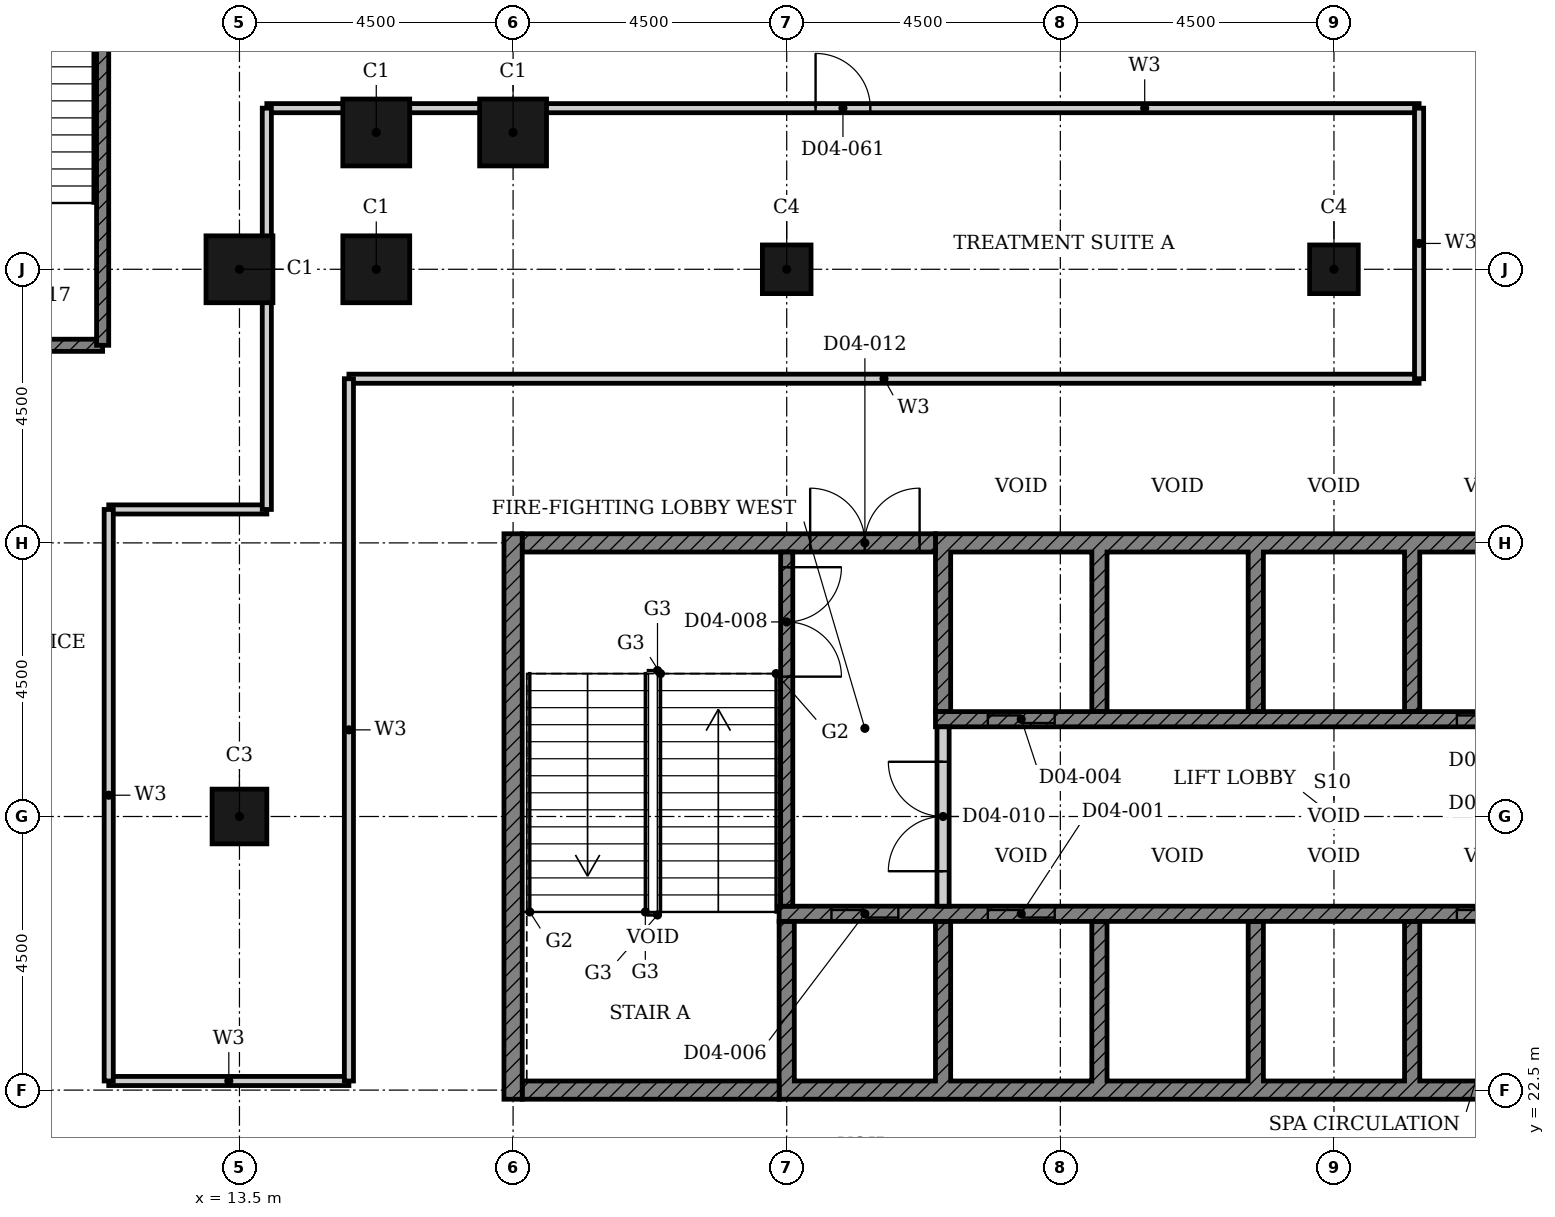
"""IFC4 building model, lengths in metres.
Left out: names, types, materials, properties, quantities, classifications, styles, units other than length and angle.
Written with IfcOpenShell. Run it as: python <this file> out.ifc"""

import sys

from ifc_helpers import new_model, si_unit, direction, frame, frame_2d, origin, origin_2d, place, context, subcontext, project, spatial, polyline, rectangle, hollow_rectangle, outline, extrude, element, fill, save


model = new_model("IFC4")
c1 = context("Model", 3, precision=1e-05, world=origin(), true_north=direction((0.0, 1.0)))
c2 = subcontext(c1, "Body", "Model", "MODEL_VIEW")
j1 = project(units=[si_unit("LENGTHUNIT", "METRE"), si_unit("PLANEANGLEUNIT", "RADIAN")], contexts=[c1])
p1 = place(None, origin())
s1 = spatial("IfcSite", under=j1, at=p1, CompositionType="ELEMENT")
p2 = place(p1, origin())
s2 = spatial("IfcBuilding", under=s1, at=p2, CompositionType="ELEMENT")
p3 = place(p2, frame((0.0, 0.0, 24.0)))
s3 = spatial("IfcBuildingStorey", under=s2, at=p3, CompositionType="ELEMENT", Elevation=24.0)
for number, where, z_axis, x_axis in (
    (1, (18.0, 38.25, 0.0), (0.0, 0.0, 1.0), (1.0, 0.0, 0.0)),
    (2, (15.75, 38.25, 0.0), (0.0, 0.0, 1.0), (1.0, 0.0, 0.0)),
    (3, (15.75, 36.0, 0.0), (0.0, 0.0, 1.0), (1.0, 0.0, 0.0)),
    (4, (13.5, 36.0, 0.0), (0.0, 0.0, 1.0), (1.0, 0.0, 0.0)),
):
    element("IfcColumn", number, at=place(p3, frame(where, z_axis=z_axis, x_axis=x_axis)), inside=s3, PredefinedType="COLUMN", context=c2, shape_type="SweptSolid", body=[
        extrude(hollow_rectangle(XDim=1.1, YDim=1.1, WallThickness=0.036, at=origin_2d()), origin(), (0.0, 0.0, 1.0), 4.8),
    ])
p4 = place(p3, frame((13.5, 27.0, 0.0), z_axis=(0.0, 0.0, 1.0), x_axis=(1.0, 0.0, 0.0)))
e5 = element("IfcColumn", 5, at=p4, inside=s3, PredefinedType="COLUMN", context=c2, shape_type="SweptSolid", body=[
    extrude(hollow_rectangle(XDim=0.9, YDim=0.9, WallThickness=0.028, at=origin_2d()), origin(), (0.0, 0.0, 1.0), 4.8),
])
for number, where, z_axis, x_axis in (
    (6, (22.5, 36.0, 0.0), (0.0, 0.0, 1.0), (1.0, 0.0, 0.0)),
    (7, (31.5, 36.0, 0.0), (0.0, 0.0, 1.0), (1.0, 0.0, 0.0)),
):
    element("IfcColumn", number, at=place(p3, frame(where, z_axis=z_axis, x_axis=x_axis)), inside=s3, PredefinedType="COLUMN", context=c2, shape_type="SweptSolid", body=[
        extrude(hollow_rectangle(XDim=0.8, YDim=0.8, WallThickness=0.025, at=origin_2d()), origin(), (0.0, 0.0, 1.0), 4.8),
    ])
p5 = place(p3, origin())
e8 = element("IfcWall", 8, at=p5, inside=s3, PredefinedType="SHEAR", context=c2, shape_type="SweptSolid", body=[
    extrude(outline(polyline([(22.375, 22.35), (38.053, 22.35), (38.053, 25.275), (37.803, 25.275), (37.803, 22.65), (35.482, 22.65), (35.482, 25.275), (35.232, 25.275), (35.232, 22.65), (32.911, 22.65), (32.911, 25.275), (32.661, 25.275), (32.661, 22.65), (30.339, 22.65), (30.339, 25.275), (30.089, 25.275), (30.089, 22.65), (27.768, 22.65), (27.768, 25.275), (27.518, 25.275), (27.518, 22.65), (25.197, 22.65), (25.197, 25.275), (24.947, 25.275), (24.947, 22.65), (22.625, 22.65), (22.625, 25.275), (22.375, 25.275), (22.375, 22.35)])), origin(), (0.0, 0.0, 1.0), 4.45),
])
p6 = place(p3, origin())
e9 = element("IfcWall", 9, at=p6, inside=s3, PredefinedType="SHEAR", context=c2, shape_type="SweptSolid", body=[
    extrude(outline(polyline([(24.947, 28.725), (25.197, 28.725), (25.197, 31.35), (27.518, 31.35), (27.518, 28.725), (27.768, 28.725), (27.768, 31.35), (30.089, 31.35), (30.089, 28.725), (30.339, 28.725), (30.339, 31.35), (32.661, 31.35), (32.661, 28.725), (32.911, 28.725), (32.911, 31.35), (35.232, 31.35), (35.232, 28.725), (35.482, 28.725), (35.482, 31.35), (37.803, 31.35), (37.803, 28.725), (38.053, 28.725), (38.053, 31.35), (40.375, 31.35), (40.375, 28.725), (40.625, 28.725), (40.625, 31.65), (24.947, 31.65), (24.947, 28.725)])), origin(), (0.0, 0.0, 1.0), 4.45),
])
p7 = place(p3, frame((18.15, 22.5, 0.0), z_axis=(0.0, 0.0, 1.0), x_axis=(1.0, 0.0, 0.0)))
e10 = element("IfcWall", 10, at=p7, inside=s3, PredefinedType="SHEAR", context=c2, shape_type="SweptSolid", body=[
    extrude(rectangle(XDim=4.225, YDim=0.3, at=frame_2d((2.113, 0.0))), origin(), (0.0, 0.0, 1.0), 4.45),
])
p8 = place(p3, frame((18.15, 31.5, 0.0), z_axis=(0.0, 0.0, 1.0), x_axis=(1.0, 0.0, 0.0)))
e11 = element("IfcWall", 11, at=p8, inside=s3, PredefinedType="SHEAR", context=c2, shape_type="SweptSolid", body=[
    extrude(rectangle(XDim=6.797, YDim=0.3, at=frame_2d((3.398, 0.0))), origin(), (0.0, 0.0, 1.0), 4.45),
])
p9 = place(p8, frame((4.736, 0.0, 0.0)))
e12 = element("IfcOpeningElement", 12, at=p9, cuts=e11, PredefinedType="OPENING", context=c2, shape_type="SweptSolid", body=[
    extrude(rectangle(XDim=1.8, YDim=2.1, at=frame_2d((0.9, 1.05))), frame((0.0, 0.16, 0.0), z_axis=(0.0, -1.0, 0.0), x_axis=(1.0, 0.0, 0.0)), (0.0, 0.0, 1.0), 0.32),
])
p10 = place(p3, frame((18.0, 22.35, 0.0), z_axis=(0.0, 0.0, 1.0), x_axis=(0.0, 1.0, 0.0)))
e13 = element("IfcWall", 13, at=p10, inside=s3, PredefinedType="SHEAR", context=c2, shape_type="SweptSolid", body=[
    extrude(rectangle(XDim=9.3, YDim=0.3, at=frame_2d((4.65, 0.0))), origin(), (0.0, 0.0, 1.0), 4.45),
])
p11 = place(p3, frame((22.375, 25.4, 0.0), z_axis=(0.0, 0.0, 1.0), x_axis=(1.0, 0.0, 0.0)))
e14 = element("IfcWall", 14, at=p11, inside=s3, PredefinedType="SHEAR", context=c2, shape_type="SweptSolid", body=[
    extrude(rectangle(XDim=15.678, YDim=0.25, at=frame_2d((7.839, 0.0))), origin(), (0.0, 0.0, 1.0), 4.45),
])
p12 = place(p11, frame((3.432, 0.0, 0.0)))
e15 = element("IfcOpeningElement", 15, at=p12, cuts=e14, PredefinedType="OPENING", context=c2, shape_type="SweptSolid", body=[
    extrude(rectangle(XDim=1.1, YDim=2.1, at=frame_2d((0.55, 1.05))), frame((0.0, 0.135, 0.0), z_axis=(0.0, -1.0, 0.0), x_axis=(1.0, 0.0, 0.0)), (0.0, 0.0, 1.0), 0.27),
])
p13 = place(p11, frame((11.146, 0.0, 0.0)))
e16 = element("IfcOpeningElement", 16, at=p13, cuts=e14, PredefinedType="OPENING", context=c2, shape_type="SweptSolid", body=[
    extrude(rectangle(XDim=1.1, YDim=2.1, at=frame_2d((0.55, 1.05))), frame((0.0, 0.135, 0.0), z_axis=(0.0, -1.0, 0.0), x_axis=(1.0, 0.0, 0.0)), (0.0, 0.0, 1.0), 0.27),
])
p14 = place(p11, frame((13.718, 0.0, 0.0)))
e17 = element("IfcOpeningElement", 17, at=p14, cuts=e14, PredefinedType="OPENING", context=c2, shape_type="SweptSolid", body=[
    extrude(rectangle(XDim=1.1, YDim=2.1, at=frame_2d((0.55, 1.05))), frame((0.0, 0.135, 0.0), z_axis=(0.0, -1.0, 0.0), x_axis=(1.0, 0.0, 0.0)), (0.0, 0.0, 1.0), 0.27),
])
p15 = place(p11, frame((0.861, 0.0, 0.0)))
e18 = element("IfcOpeningElement", 18, at=p15, cuts=e14, PredefinedType="OPENING", context=c2, shape_type="SweptSolid", body=[
    extrude(rectangle(XDim=1.1, YDim=2.1, at=frame_2d((0.55, 1.05))), frame((0.0, 0.135, 0.0), z_axis=(0.0, -1.0, 0.0), x_axis=(1.0, 0.0, 0.0)), (0.0, 0.0, 1.0), 0.27),
])
p16 = place(p3, frame((24.947, 28.6, 0.0), z_axis=(0.0, 0.0, 1.0), x_axis=(1.0, 0.0, 0.0)))
e19 = element("IfcWall", 19, at=p16, inside=s3, PredefinedType="SHEAR", context=c2, shape_type="SweptSolid", body=[
    extrude(rectangle(XDim=15.678, YDim=0.25, at=frame_2d((7.839, 0.0))), origin(), (0.0, 0.0, 1.0), 4.45),
])
p17 = place(p16, frame((0.861, 0.0, 0.0)))
e20 = element("IfcOpeningElement", 20, at=p17, cuts=e19, PredefinedType="OPENING", context=c2, shape_type="SweptSolid", body=[
    extrude(rectangle(XDim=1.1, YDim=2.1, at=frame_2d((0.55, 1.05))), frame((0.0, 0.135, 0.0), z_axis=(0.0, -1.0, 0.0), x_axis=(1.0, 0.0, 0.0)), (0.0, 0.0, 1.0), 0.27),
])
p18 = place(p16, frame((8.575, 0.0, 0.0)))
e21 = element("IfcOpeningElement", 21, at=p18, cuts=e19, PredefinedType="OPENING", context=c2, shape_type="SweptSolid", body=[
    extrude(rectangle(XDim=1.1, YDim=2.1, at=frame_2d((0.55, 1.05))), frame((0.0, 0.135, 0.0), z_axis=(0.0, -1.0, 0.0), x_axis=(1.0, 0.0, 0.0)), (0.0, 0.0, 1.0), 0.27),
])
p19 = place(p16, frame((13.718, 0.0, 0.0)))
e22 = element("IfcOpeningElement", 22, at=p19, cuts=e19, PredefinedType="OPENING", context=c2, shape_type="SweptSolid", body=[
    extrude(rectangle(XDim=1.1, YDim=2.1, at=frame_2d((0.55, 1.05))), frame((0.0, 0.135, 0.0), z_axis=(0.0, -1.0, 0.0), x_axis=(1.0, 0.0, 0.0)), (0.0, 0.0, 1.0), 0.27),
])
p20 = place(p3, frame((22.5, 31.35, 0.0), z_axis=(0.0, 0.0, 1.0), x_axis=(0.0, -1.0, 0.0)))
e23 = element("IfcWall", 23, at=p20, inside=s3, PredefinedType="SHEAR", context=c2, shape_type="SweptSolid", body=[
    extrude(rectangle(XDim=5.825, YDim=0.2, at=frame_2d((2.913, 0.0))), origin(), (0.0, 0.0, 1.0), 4.45),
])
p21 = place(p20, frame((0.25, 0.0, 0.0)))
e24 = element("IfcOpeningElement", 24, at=p21, cuts=e23, PredefinedType="OPENING", context=c2, shape_type="SweptSolid", body=[
    extrude(rectangle(XDim=1.8, YDim=2.1, at=frame_2d((0.9, 1.05))), frame((0.0, 0.11, 0.0), z_axis=(0.0, -1.0, 0.0), x_axis=(1.0, 0.0, 0.0)), (0.0, 0.0, 1.0), 0.22),
])
p22 = place(p3, frame((25.072, 25.525, 0.0), z_axis=(0.0, 0.0, 1.0), x_axis=(0.0, 1.0, 0.0)))
e25 = element("IfcWall", 25, at=p22, inside=s3, PredefinedType="PARTITIONING", context=c2, shape_type="SweptSolid", body=[
    extrude(rectangle(XDim=2.95, YDim=0.2, at=frame_2d((1.475, 0.0))), origin(), (0.0, 0.0, 1.0), 4.45),
])
p23 = place(p22, frame((0.575, 0.0, 0.0)))
e26 = element("IfcOpeningElement", 26, at=p23, cuts=e25, PredefinedType="OPENING", context=c2, shape_type="SweptSolid", body=[
    extrude(rectangle(XDim=1.8, YDim=2.1, at=frame_2d((0.9, 1.05))), frame((0.0, 0.11, 0.0), z_axis=(0.0, -1.0, 0.0), x_axis=(1.0, 0.0, 0.0)), (0.0, 0.0, 1.0), 0.22),
])
p24 = place(p3, frame((11.35, 22.65, 0.0), z_axis=(0.0, 0.0, 1.0), x_axis=(1.0, 0.0, 0.0)))
e27 = element("IfcWall", 27, at=p24, inside=s3, PredefinedType="PARTITIONING", context=c2, shape_type="SweptSolid", body=[
    extrude(rectangle(XDim=3.95, YDim=0.15, at=frame_2d((1.975, 0.0))), origin(), (0.0, 0.0, 1.0), 4.45),
])
p25 = place(p3, frame((11.35, 32.05, 0.0), z_axis=(0.0, 0.0, 1.0), x_axis=(1.0, 0.0, 0.0)))
e28 = element("IfcWall", 28, at=p25, inside=s3, PredefinedType="PARTITIONING", context=c2, shape_type="SweptSolid", body=[
    extrude(rectangle(XDim=2.6, YDim=0.15, at=frame_2d((1.3, 0.0))), origin(), (0.0, 0.0, 1.0), 4.45),
])
p26 = place(p3, frame((15.3, 34.2, 0.0), z_axis=(0.0, 0.0, 1.0), x_axis=(1.0, 0.0, 0.0)))
e29 = element("IfcWall", 29, at=p26, inside=s3, PredefinedType="PARTITIONING", context=c2, shape_type="SweptSolid", body=[
    extrude(rectangle(XDim=17.6, YDim=0.15, at=frame_2d((8.8, 0.0))), origin(), (0.0, 0.0, 1.0), 4.45),
])
p27 = place(p3, frame((13.95, 38.65, 0.0), z_axis=(0.0, 0.0, 1.0), x_axis=(1.0, 0.0, 0.0)))
e30 = element("IfcWall", 30, at=p27, inside=s3, PredefinedType="PARTITIONING", context=c2, shape_type="SweptSolid", body=[
    extrude(rectangle(XDim=18.95, YDim=0.15, at=frame_2d((9.475, 0.0))), origin(), (0.0, 0.0, 1.0), 4.45),
])
p28 = place(p27, frame((9.025, 0.0, 0.0)))
e31 = element("IfcOpeningElement", 31, at=p28, cuts=e30, PredefinedType="OPENING", context=c2, shape_type="SweptSolid", body=[
    extrude(rectangle(XDim=0.9, YDim=2.1, at=frame_2d((0.45, 1.05))), frame((0.0, 0.085, 0.0), z_axis=(0.0, -1.0, 0.0), x_axis=(1.0, 0.0, 0.0)), (0.0, 0.0, 1.0), 0.17),
])
p29 = place(p3, frame((11.35, 22.65, 0.0), z_axis=(0.0, 0.0, 1.0), x_axis=(0.0, 1.0, 0.0)))
e32 = element("IfcWall", 32, at=p29, inside=s3, PredefinedType="PARTITIONING", context=c2, shape_type="SweptSolid", body=[
    extrude(rectangle(XDim=9.4, YDim=0.15, at=frame_2d((4.7, 0.0))), origin(), (0.0, 0.0, 1.0), 4.45),
])
p30 = place(p3, frame((13.95, 32.05, 0.0), z_axis=(0.0, 0.0, 1.0), x_axis=(0.0, 1.0, 0.0)))
e33 = element("IfcWall", 33, at=p30, inside=s3, PredefinedType="PARTITIONING", context=c2, shape_type="SweptSolid", body=[
    extrude(rectangle(XDim=6.6, YDim=0.15, at=frame_2d((3.3, 0.0))), origin(), (0.0, 0.0, 1.0), 4.45),
])
p31 = place(p3, frame((15.3, 22.65, 0.0), z_axis=(0.0, 0.0, 1.0), x_axis=(0.0, 1.0, 0.0)))
e34 = element("IfcWall", 34, at=p31, inside=s3, PredefinedType="PARTITIONING", context=c2, shape_type="SweptSolid", body=[
    extrude(rectangle(XDim=11.55, YDim=0.15, at=frame_2d((5.775, 0.0))), origin(), (0.0, 0.0, 1.0), 4.45),
])
p32 = place(p3, frame((32.9, 34.2, 0.0), z_axis=(0.0, 0.0, 1.0), x_axis=(0.0, 1.0, 0.0)))
e35 = element("IfcWall", 35, at=p32, inside=s3, PredefinedType="PARTITIONING", context=c2, shape_type="SweptSolid", body=[
    extrude(rectangle(XDim=4.45, YDim=0.15, at=frame_2d((2.225, 0.0))), origin(), (0.0, 0.0, 1.0), 4.45),
])
p33 = place(p3, frame((6.75, 34.75, 0.0), z_axis=(0.0, 0.0, 1.0), x_axis=(1.0, 0.0, 0.0)))
e36 = element("IfcWall", 36, at=p33, inside=s3, PredefinedType="SHEAR", context=c2, shape_type="SweptSolid", body=[
    extrude(rectangle(XDim=4.5, YDim=0.2, at=frame_2d((2.25, 0.0))), origin(), (0.0, 0.0, 1.0), 4.45),
])
p34 = place(p3, frame((11.25, 34.75, 0.0), z_axis=(0.0, 0.0, 1.0), x_axis=(0.0, 1.0, 0.0)))
e37 = element("IfcWall", 37, at=p34, inside=s3, PredefinedType="SHEAR", context=c2, shape_type="SweptSolid", body=[
    extrude(rectangle(XDim=8.45, YDim=0.2, at=frame_2d((4.225, 0.0))), origin(), (0.0, 0.0, 1.0), 4.45),
])
p35 = place(p12, origin())
e38 = element("IfcDoor", 38, at=p35, inside=s3, OperationType="DOUBLE_DOOR_SLIDING", PredefinedType="DOOR", context=c2, shape_type="SweptSolid", body=[
    extrude(rectangle(XDim=1.1, YDim=2.1, at=frame_2d((0.55, 1.05))), frame((0.0, 0.025, 0.0), z_axis=(0.0, -1.0, 0.0), x_axis=(1.0, 0.0, 0.0)), (0.0, 0.0, 1.0), 0.05),
])
fill(e15, e38)
p36 = place(p13, origin())
e39 = element("IfcDoor", 39, at=p36, inside=s3, OperationType="DOUBLE_DOOR_SLIDING", PredefinedType="DOOR", context=c2, shape_type="SweptSolid", body=[
    extrude(rectangle(XDim=1.1, YDim=2.1, at=frame_2d((0.55, 1.05))), frame((0.0, 0.025, 0.0), z_axis=(0.0, -1.0, 0.0), x_axis=(1.0, 0.0, 0.0)), (0.0, 0.0, 1.0), 0.05),
])
fill(e16, e39)
p37 = place(p17, origin())
e40 = element("IfcDoor", 40, at=p37, inside=s3, OperationType="DOUBLE_DOOR_SLIDING", PredefinedType="DOOR", context=c2, shape_type="SweptSolid", body=[
    extrude(rectangle(XDim=1.1, YDim=2.1, at=frame_2d((0.55, 1.05))), frame((0.0, 0.025, 0.0), z_axis=(0.0, -1.0, 0.0), x_axis=(1.0, 0.0, 0.0)), (0.0, 0.0, 1.0), 0.05),
])
fill(e20, e40)
p38 = place(p18, origin())
e41 = element("IfcDoor", 41, at=p38, inside=s3, OperationType="DOUBLE_DOOR_SLIDING", PredefinedType="DOOR", context=c2, shape_type="SweptSolid", body=[
    extrude(rectangle(XDim=1.1, YDim=2.1, at=frame_2d((0.55, 1.05))), frame((0.0, 0.025, 0.0), z_axis=(0.0, -1.0, 0.0), x_axis=(1.0, 0.0, 0.0)), (0.0, 0.0, 1.0), 0.05),
])
fill(e21, e41)
p39 = place(p15, origin())
e42 = element("IfcDoor", 42, at=p39, inside=s3, OperationType="DOUBLE_DOOR_SLIDING", PredefinedType="DOOR", context=c2, shape_type="SweptSolid", body=[
    extrude(rectangle(XDim=1.1, YDim=2.1, at=frame_2d((0.55, 1.05))), frame((0.0, 0.025, 0.0), z_axis=(0.0, -1.0, 0.0), x_axis=(1.0, 0.0, 0.0)), (0.0, 0.0, 1.0), 0.05),
])
fill(e18, e42)
p40 = place(p21, origin())
e43 = element("IfcDoor", 43, at=p40, inside=s3, OperationType="DOUBLE_DOOR_SINGLE_SWING", PredefinedType="DOOR", context=c2, shape_type="SweptSolid", body=[
    extrude(rectangle(XDim=1.8, YDim=2.1, at=frame_2d((0.9, 1.05))), frame((0.0, 0.025, 0.0), z_axis=(0.0, -1.0, 0.0), x_axis=(1.0, 0.0, 0.0)), (0.0, 0.0, 1.0), 0.05),
])
fill(e24, e43)
p41 = place(p23, origin())
e44 = element("IfcDoor", 44, at=p41, inside=s3, OperationType="DOUBLE_DOOR_SINGLE_SWING", PredefinedType="DOOR", context=c2, shape_type="SweptSolid", body=[
    extrude(rectangle(XDim=1.8, YDim=2.1, at=frame_2d((0.9, 1.05))), frame((0.0, 0.025, 0.0), z_axis=(0.0, -1.0, 0.0), x_axis=(1.0, 0.0, 0.0)), (0.0, 0.0, 1.0), 0.05),
])
fill(e26, e44)
p42 = place(p9, origin())
e45 = element("IfcDoor", 45, at=p42, inside=s3, OperationType="DOUBLE_DOOR_SINGLE_SWING", PredefinedType="DOOR", context=c2, shape_type="SweptSolid", body=[
    extrude(rectangle(XDim=1.8, YDim=2.1, at=frame_2d((0.9, 1.05))), frame((0.0, 0.025, 0.0), z_axis=(0.0, -1.0, 0.0), x_axis=(1.0, 0.0, 0.0)), (0.0, 0.0, 1.0), 0.05),
])
fill(e12, e45)
p43 = place(p28, origin())
e46 = element("IfcDoor", 46, at=p43, inside=s3, OperationType="SINGLE_SWING_LEFT", PredefinedType="DOOR", context=c2, shape_type="SweptSolid", body=[
    extrude(rectangle(XDim=0.9, YDim=2.1, at=frame_2d((0.45, 1.05))), frame((0.0, 0.025, 0.0), z_axis=(0.0, -1.0, 0.0), x_axis=(1.0, 0.0, 0.0)), (0.0, 0.0, 1.0), 0.05),
])
fill(e31, e46)
save(model, sys.argv[1])
